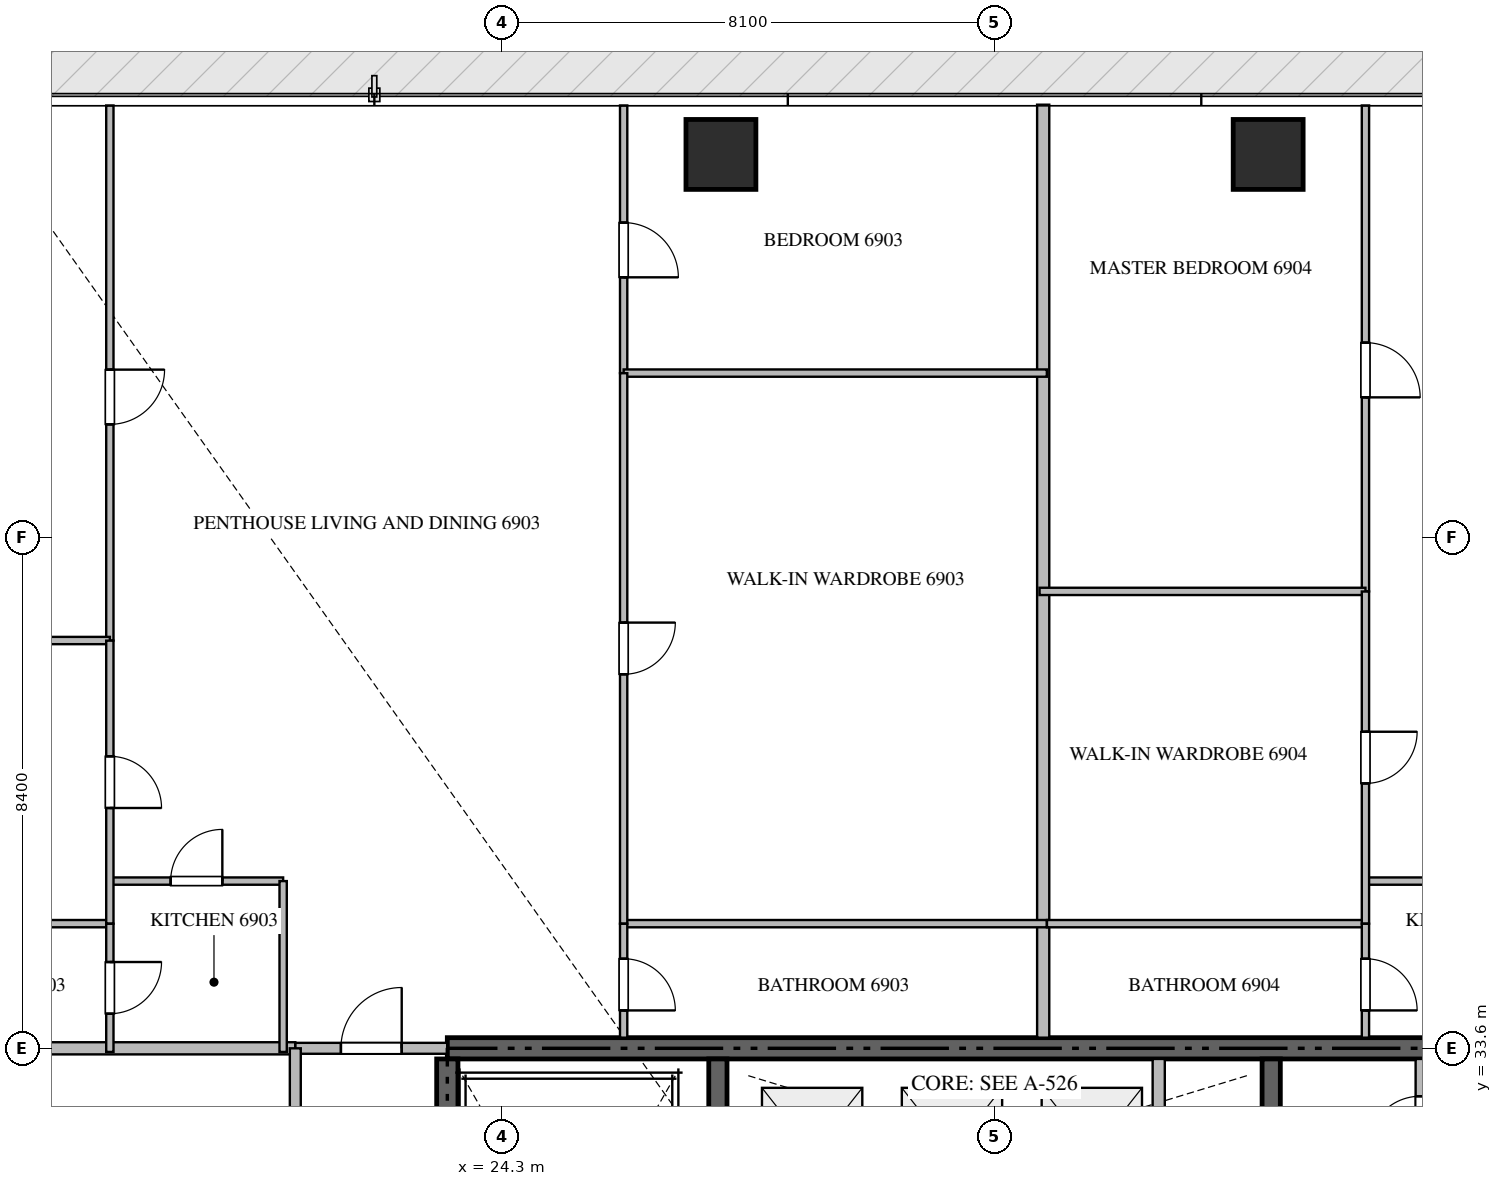
"""IFC4 building model, lengths in metres.
Left out: names, types, materials, properties, quantities, classifications, styles, units other than length and angle.
Written with IfcOpenShell. Run it as: python <this file> out.ifc"""

import sys

from ifc_helpers import new_model, si_unit, direction, frame, frame_2d, origin, origin_2d, place, context, subcontext, project, spatial, rectangle, extrude, source, transform, mapped, element, fill, save


model = new_model("IFC4")
c1 = context("Model", 3, precision=1e-05, world=origin(), true_north=direction((0.0, 1.0)))
c2 = subcontext(c1, "Body", "Model", "MODEL_VIEW")
j1 = project(units=[si_unit("LENGTHUNIT", "METRE"), si_unit("PLANEANGLEUNIT", "RADIAN")], contexts=[c1])
p1 = place(None, origin())
s1 = spatial("IfcSite", under=j1, at=p1, CompositionType="ELEMENT")
p2 = place(p1, origin())
s2 = spatial("IfcBuilding", under=s1, at=p2, CompositionType="ELEMENT")
p3 = place(p2, frame((0.0, 0.0, 275.9)))
s3 = spatial("IfcBuildingStorey", under=s2, at=p3, CompositionType="ELEMENT", Elevation=275.9)
p4 = place(p3, frame((41.4, 33.6, -0.26), z_axis=(0.0, 0.0, 1.0), x_axis=(-1.0, 0.0, 0.0)))
e1 = element("IfcWall", 1, at=p4, inside=s3, PredefinedType="SHEAR", context=c2, shape_type="SweptSolid", body=[
    extrude(rectangle(XDim=18.0, YDim=0.35, at=frame_2d((9.0, 0.0))), origin(), (0.0, 0.0, 1.0), 3.848),
])
p5 = place(p3, frame((23.4, 24.25, -0.26), z_axis=(0.0, 0.0, 1.0), x_axis=(0.0, 1.0, 0.0)))
e2 = element("IfcWall", 2, at=p5, inside=s3, PredefinedType="SHEAR", context=c2, shape_type="SweptSolid", body=[
    extrude(rectangle(XDim=9.175, YDim=0.35, at=frame_2d((4.587, 0.0))), origin(), (0.0, 0.0, 1.0), 3.848),
])
p6 = place(p3, frame((27.85, 23.55, -0.26), z_axis=(0.0, 0.0, 1.0), x_axis=(0.0, 1.0, 0.0)))
e3 = element("IfcWall", 3, at=p6, inside=s3, PredefinedType="SHEAR", context=c2, shape_type="SweptSolid", body=[
    extrude(rectangle(XDim=9.875, YDim=0.3, at=frame_2d((4.938, 0.0))), origin(), (0.0, 0.0, 1.0), 3.848),
])
p7 = place(p3, frame((36.95, 27.05, -0.26), z_axis=(0.0, 0.0, 1.0), x_axis=(0.0, 1.0, 0.0)))
e4 = element("IfcWall", 4, at=p7, inside=s3, PredefinedType="SHEAR", context=c2, shape_type="SweptSolid", body=[
    extrude(rectangle(XDim=6.375, YDim=0.3, at=frame_2d((3.188, 0.0))), origin(), (0.0, 0.0, 1.0), 3.848),
])
m1 = source(origin(), c2, "Body", "SweptSolid", [
    extrude(rectangle(XDim=1.15, YDim=1.15, at=origin_2d()), origin(), (0.0, 0.0, 1.0), 3.85),
])
for number, where, z_axis, x_axis in (
    (5, (27.9, 48.3, -0.26), (0.0, 0.0, 1.0), (1.0, 0.0, 0.0)),
    (6, (36.9, 48.3, -0.26), (0.0, 0.0, 1.0), (1.0, 0.0, 0.0)),
):
    element("IfcColumn", number, at=place(p3, frame(where, z_axis=z_axis, x_axis=x_axis)), inside=s3, PredefinedType="COLUMN", context=c2, shape_type="MappedRepresentation", body=[
        mapped(m1, transform((0.0, 0.0, 0.0), scale=1.0)),
    ])
p8 = place(p3, frame((35.1, 30.75, 0.0), z_axis=(0.0, 0.0, 1.0), x_axis=(0.0, 1.0, 0.0)))
e7 = element("IfcWall", 7, at=p8, inside=s3, PredefinedType="STANDARD", context=c2, shape_type="SweptSolid", body=[
    extrude(rectangle(XDim=2.675, YDim=0.2, at=frame_2d((1.337, 0.0))), origin(), (0.0, 0.0, 1.0), 3.59),
])
p9 = place(p3, frame((39.4, 31.35, 0.0), z_axis=(0.0, 0.0, 1.0), x_axis=(0.0, 1.0, 0.0)))
e8 = element("IfcWall", 8, at=p9, inside=s3, PredefinedType="PARTITIONING", context=c2, shape_type="SweptSolid", body=[
    extrude(rectangle(XDim=2.075, YDim=0.15, at=frame_2d((1.038, 0.0))), origin(), (0.0, 0.0, 1.0), 3.59),
])
p10 = place(p9, frame((0.612, 0.0, 0.0)))
e9 = element("IfcOpeningElement", 9, at=p10, cuts=e8, PredefinedType="OPENING", context=c2, shape_type="SweptSolid", body=[
    extrude(rectangle(XDim=0.85, YDim=2.1, at=frame_2d((0.425, 1.05))), frame((0.0, 0.085, 0.0), z_axis=(0.0, -1.0, 0.0), x_axis=(1.0, 0.0, 0.0)), (0.0, 0.0, 1.0), 0.17),
])
p11 = place(p3, frame((33.2, 33.775, 0.0), z_axis=(0.0, 0.0, 1.0), x_axis=(0.0, 1.0, 0.0)))
e10 = element("IfcWall", 10, at=p11, inside=s3, PredefinedType="PARTITIONING", context=c2, shape_type="SweptSolid", body=[
    extrude(rectangle(XDim=15.343, YDim=0.2, at=frame_2d((7.671, 0.0))), origin(), (0.0, 0.0, 1.0), 3.59),
])
p12 = place(p3, frame((7.482, 33.6, 0.0), z_axis=(0.0, 0.0, 1.0), x_axis=(1.0, 0.0, 0.0)))
e11 = element("IfcWall", 11, at=p12, inside=s3, PredefinedType="PARTITIONING", context=c2, shape_type="SweptSolid", body=[
    extrude(rectangle(XDim=13.418, YDim=0.2, at=frame_2d((6.709, 0.0))), origin(), (0.0, 0.0, 1.0), 3.59),
])
p13 = place(p3, frame((20.902, 33.6, 0.0), z_axis=(0.0, 0.0, 1.0), x_axis=(1.0, 0.0, 0.0)))
e12 = element("IfcWall", 12, at=p13, inside=s3, PredefinedType="PARTITIONING", context=c2, shape_type="SweptSolid", body=[
    extrude(rectangle(XDim=2.496, YDim=0.18, at=frame_2d((1.248, 0.0))), origin(), (0.0, 0.0, 1.0), 3.59),
])
p14 = place(p13, frame((0.748, 0.0, 0.0)))
e13 = element("IfcOpeningElement", 13, at=p14, cuts=e12, PredefinedType="OPENING", context=c2, shape_type="SweptSolid", body=[
    extrude(rectangle(XDim=1.0, YDim=2.15, at=frame_2d((0.5, 1.075))), frame((0.0, 0.1, 0.0), z_axis=(0.0, -1.0, 0.0), x_axis=(1.0, 0.0, 0.0)), (0.0, 0.0, 1.0), 0.2),
])
p15 = place(p3, frame((20.9, 16.8, 0.0), z_axis=(0.0, 0.0, 1.0), x_axis=(0.0, 1.0, 0.0)))
e14 = element("IfcWall", 14, at=p15, inside=s3, PredefinedType="PARTITIONING", context=c2, shape_type="SweptSolid", body=[
    extrude(rectangle(XDim=16.8, YDim=0.18, at=frame_2d((8.4, 0.0))), origin(), (0.0, 0.0, 1.0), 3.59),
])
p16 = place(p15, frame((4.898, 0.0, 0.0)))
e15 = element("IfcOpeningElement", 15, at=p16, cuts=e14, PredefinedType="OPENING", context=c2, shape_type="SweptSolid", body=[
    extrude(rectangle(XDim=1.0, YDim=2.15, at=frame_2d((0.5, 1.075))), frame((0.0, 0.1, 0.0), z_axis=(0.0, -1.0, 0.0), x_axis=(1.0, 0.0, 0.0)), (0.0, 0.0, 1.0), 0.2),
])
p17 = place(p15, frame((13.335, 0.0, 0.0)))
e16 = element("IfcOpeningElement", 16, at=p17, cuts=e14, PredefinedType="OPENING", context=c2, shape_type="SweptSolid", body=[
    extrude(rectangle(XDim=1.0, YDim=2.15, at=frame_2d((0.5, 1.075))), frame((0.0, 0.1, 0.0), z_axis=(0.0, -1.0, 0.0), x_axis=(1.0, 0.0, 0.0)), (0.0, 0.0, 1.0), 0.2),
])
p18 = place(p3, frame((17.85, 36.35, 0.0), z_axis=(0.0, 0.0, 1.0), x_axis=(1.0, 0.0, 0.0)))
e17 = element("IfcWall", 17, at=p18, inside=s3, PredefinedType="PARTITIONING", context=c2, shape_type="SweptSolid", body=[
    extrude(rectangle(XDim=2.85, YDim=0.12, at=frame_2d((1.425, 0.0))), origin(), (0.0, 0.0, 1.0), 3.59),
])
p19 = place(p18, frame((1.0, 0.0, 0.0)))
e18 = element("IfcOpeningElement", 18, at=p19, cuts=e17, PredefinedType="OPENING", context=c2, shape_type="SweptSolid", body=[
    extrude(rectangle(XDim=0.85, YDim=2.1, at=frame_2d((0.425, 1.05))), frame((0.0, 0.07, 0.0), z_axis=(0.0, -1.0, 0.0), x_axis=(1.0, 0.0, 0.0)), (0.0, 0.0, 1.0), 0.14),
])
p20 = place(p3, frame((20.7, 36.35, 0.0), z_axis=(0.0, 0.0, 1.0), x_axis=(0.0, -1.0, 0.0)))
e19 = element("IfcWall", 19, at=p20, inside=s3, PredefinedType="PARTITIONING", context=c2, shape_type="SweptSolid", body=[
    extrude(rectangle(XDim=2.81, YDim=0.12, at=frame_2d((1.405, 0.0))), origin(), (0.0, 0.0, 1.0), 3.59),
])
p21 = place(p3, frame((17.85, 49.105, 0.0), z_axis=(0.0, 0.0, 1.0), x_axis=(0.0, -1.0, 0.0)))
e20 = element("IfcWall", 20, at=p21, inside=s3, PredefinedType="PARTITIONING", context=c2, shape_type="SweptSolid", body=[
    extrude(rectangle(XDim=8.799, YDim=0.12, at=frame_2d((4.399, 0.0))), origin(), (0.0, 0.0, 1.0), 3.59),
])
p22 = place(p21, frame((4.344, 0.0, 0.0)))
e21 = element("IfcOpeningElement", 21, at=p22, cuts=e20, PredefinedType="OPENING", context=c2, shape_type="SweptSolid", body=[
    extrude(rectangle(XDim=0.9, YDim=2.1, at=frame_2d((0.45, 1.05))), frame((0.0, 0.07, 0.0), z_axis=(0.0, -1.0, 0.0), x_axis=(1.0, 0.0, 0.0)), (0.0, 0.0, 1.0), 0.14),
])
p23 = place(p3, frame((7.495, 40.306, 0.0), z_axis=(0.0, 0.0, 1.0), x_axis=(1.0, 0.0, 0.0)))
e22 = element("IfcWall", 22, at=p23, inside=s3, PredefinedType="PARTITIONING", context=c2, shape_type="SweptSolid", body=[
    extrude(rectangle(XDim=10.355, YDim=0.12, at=frame_2d((5.177, 0.0))), origin(), (0.0, 0.0, 1.0), 3.122),
])
p24 = place(p3, frame((14.65, 35.65, 0.0), z_axis=(0.0, 0.0, 1.0), x_axis=(1.0, 0.0, 0.0)))
e23 = element("IfcWall", 23, at=p24, inside=s3, PredefinedType="PARTITIONING", context=c2, shape_type="SweptSolid", body=[
    extrude(rectangle(XDim=3.2, YDim=0.12, at=frame_2d((1.6, 0.0))), origin(), (0.0, 0.0, 1.0), 3.59),
])
p25 = place(p3, frame((17.85, 40.304, 0.0), z_axis=(0.0, 0.0, 1.0), x_axis=(0.0, -1.0, 0.0)))
e24 = element("IfcWall", 24, at=p25, inside=s3, PredefinedType="PARTITIONING", context=c2, shape_type="SweptSolid", body=[
    extrude(rectangle(XDim=4.654, YDim=0.12, at=frame_2d((2.327, 0.0))), origin(), (0.0, 0.0, 1.0), 3.59),
])
p26 = place(p25, frame((1.902, 0.0, 0.0)))
e25 = element("IfcOpeningElement", 25, at=p26, cuts=e24, PredefinedType="OPENING", context=c2, shape_type="SweptSolid", body=[
    extrude(rectangle(XDim=0.85, YDim=2.1, at=frame_2d((0.425, 1.05))), frame((0.0, 0.07, 0.0), z_axis=(0.0, -1.0, 0.0), x_axis=(1.0, 0.0, 0.0)), (0.0, 0.0, 1.0), 0.14),
])
p27 = place(p3, frame((17.85, 35.648, 0.0), z_axis=(0.0, 0.0, 1.0), x_axis=(0.0, -1.0, 0.0)))
e26 = element("IfcWall", 26, at=p27, inside=s3, PredefinedType="PARTITIONING", context=c2, shape_type="SweptSolid", body=[
    extrude(rectangle(XDim=2.108, YDim=0.12, at=frame_2d((1.054, 0.0))), origin(), (0.0, 0.0, 1.0), 3.59),
])
p28 = place(p27, frame((0.629, 0.0, 0.0)))
e27 = element("IfcOpeningElement", 27, at=p28, cuts=e26, PredefinedType="OPENING", context=c2, shape_type="SweptSolid", body=[
    extrude(rectangle(XDim=0.85, YDim=2.1, at=frame_2d((0.425, 1.05))), frame((0.0, 0.07, 0.0), z_axis=(0.0, -1.0, 0.0), x_axis=(1.0, 0.0, 0.0)), (0.0, 0.0, 1.0), 0.14),
])
p29 = place(p3, frame((26.3, 49.105, 0.0), z_axis=(0.0, 0.0, 1.0), x_axis=(0.0, -1.0, 0.0)))
e28 = element("IfcWall", 28, at=p29, inside=s3, PredefinedType="PARTITIONING", context=c2, shape_type="SweptSolid", body=[
    extrude(rectangle(XDim=4.401, YDim=0.12, at=frame_2d((2.2, 0.0))), origin(), (0.0, 0.0, 1.0), 3.59),
])
p30 = place(p29, frame((1.926, 0.0, 0.0)))
e29 = element("IfcOpeningElement", 29, at=p30, cuts=e28, PredefinedType="OPENING", context=c2, shape_type="SweptSolid", body=[
    extrude(rectangle(XDim=0.9, YDim=2.1, at=frame_2d((0.45, 1.05))), frame((0.0, 0.07, 0.0), z_axis=(0.0, -1.0, 0.0), x_axis=(1.0, 0.0, 0.0)), (0.0, 0.0, 1.0), 0.14),
])
for number, where, z_axis, x_axis in (
    (30, (26.3, 44.704, 0.0), (0.0, 0.0, 1.0), (1.0, 0.0, 0.0)),
    (31, (26.3, 35.65, 0.0), (0.0, 0.0, 1.0), (1.0, 0.0, 0.0)),
):
    element("IfcWall", number, at=place(p3, frame(where, z_axis=z_axis, x_axis=x_axis)), inside=s3, PredefinedType="PARTITIONING", context=c2, shape_type="SweptSolid", body=[
        extrude(rectangle(XDim=6.96, YDim=0.12, at=frame_2d((3.48, 0.0))), origin(), (0.0, 0.0, 1.0), 3.59),
    ])
p31 = place(p3, frame((26.3, 44.702, 0.0), z_axis=(0.0, 0.0, 1.0), x_axis=(0.0, -1.0, 0.0)))
e32 = element("IfcWall", 32, at=p31, inside=s3, PredefinedType="PARTITIONING", context=c2, shape_type="SweptSolid", body=[
    extrude(rectangle(XDim=9.052, YDim=0.12, at=frame_2d((4.526, 0.0))), origin(), (0.0, 0.0, 1.0), 3.59),
])
p32 = place(p31, frame((4.101, 0.0, 0.0)))
e33 = element("IfcOpeningElement", 33, at=p32, cuts=e32, PredefinedType="OPENING", context=c2, shape_type="SweptSolid", body=[
    extrude(rectangle(XDim=0.85, YDim=2.1, at=frame_2d((0.425, 1.05))), frame((0.0, 0.07, 0.0), z_axis=(0.0, -1.0, 0.0), x_axis=(1.0, 0.0, 0.0)), (0.0, 0.0, 1.0), 0.14),
])
p33 = place(p3, frame((26.3, 35.648, 0.0), z_axis=(0.0, 0.0, 1.0), x_axis=(0.0, -1.0, 0.0)))
e34 = element("IfcWall", 34, at=p33, inside=s3, PredefinedType="PARTITIONING", context=c2, shape_type="SweptSolid", body=[
    extrude(rectangle(XDim=1.873, YDim=0.12, at=frame_2d((0.937, 0.0))), origin(), (0.0, 0.0, 1.0), 3.59),
])
p34 = place(p33, frame((0.575, 0.0, 0.0)))
e35 = element("IfcOpeningElement", 35, at=p34, cuts=e34, PredefinedType="OPENING", context=c2, shape_type="SweptSolid", body=[
    extrude(rectangle(XDim=0.85, YDim=2.1, at=frame_2d((0.425, 1.05))), frame((0.0, 0.07, 0.0), z_axis=(0.0, -1.0, 0.0), x_axis=(1.0, 0.0, 0.0)), (0.0, 0.0, 1.0), 0.14),
])
p35 = place(p3, frame((38.5, 36.35, 0.0), z_axis=(0.0, 0.0, 1.0), x_axis=(1.0, 0.0, 0.0)))
e36 = element("IfcWall", 36, at=p35, inside=s3, PredefinedType="PARTITIONING", context=c2, shape_type="SweptSolid", body=[
    extrude(rectangle(XDim=2.85, YDim=0.12, at=frame_2d((1.425, 0.0))), origin(), (0.0, 0.0, 1.0), 3.59),
])
p36 = place(p35, frame((1.0, 0.0, 0.0)))
e37 = element("IfcOpeningElement", 37, at=p36, cuts=e36, PredefinedType="OPENING", context=c2, shape_type="SweptSolid", body=[
    extrude(rectangle(XDim=0.85, YDim=2.1, at=frame_2d((0.425, 1.05))), frame((0.0, 0.07, 0.0), z_axis=(0.0, -1.0, 0.0), x_axis=(1.0, 0.0, 0.0)), (0.0, 0.0, 1.0), 0.14),
])
p37 = place(p3, frame((38.5, 49.105, 0.0), z_axis=(0.0, 0.0, 1.0), x_axis=(0.0, -1.0, 0.0)))
e38 = element("IfcWall", 38, at=p37, inside=s3, PredefinedType="PARTITIONING", context=c2, shape_type="SweptSolid", body=[
    extrude(rectangle(XDim=7.991, YDim=0.12, at=frame_2d((3.996, 0.0))), origin(), (0.0, 0.0, 1.0), 3.59),
])
p38 = place(p37, frame((3.9, 0.0, 0.0)))
e39 = element("IfcOpeningElement", 39, at=p38, cuts=e38, PredefinedType="OPENING", context=c2, shape_type="SweptSolid", body=[
    extrude(rectangle(XDim=0.9, YDim=2.1, at=frame_2d((0.45, 1.05))), frame((0.0, 0.07, 0.0), z_axis=(0.0, -1.0, 0.0), x_axis=(1.0, 0.0, 0.0)), (0.0, 0.0, 1.0), 0.14),
])
p39 = place(p3, frame((33.14, 41.114, 0.0), z_axis=(0.0, 0.0, 1.0), x_axis=(1.0, 0.0, 0.0)))
e40 = element("IfcWall", 40, at=p39, inside=s3, PredefinedType="PARTITIONING", context=c2, shape_type="SweptSolid", body=[
    extrude(rectangle(XDim=5.36, YDim=0.12, at=frame_2d((2.68, 0.0))), origin(), (0.0, 0.0, 1.0), 3.59),
])
p40 = place(p3, frame((33.262, 35.65, 0.0), z_axis=(0.0, 0.0, 1.0), x_axis=(1.0, 0.0, 0.0)))
e41 = element("IfcWall", 41, at=p40, inside=s3, PredefinedType="PARTITIONING", context=c2, shape_type="SweptSolid", body=[
    extrude(rectangle(XDim=5.238, YDim=0.12, at=frame_2d((2.619, 0.0))), origin(), (0.0, 0.0, 1.0), 3.59),
])
p41 = place(p3, frame((38.5, 41.112, 0.0), z_axis=(0.0, 0.0, 1.0), x_axis=(0.0, -1.0, 0.0)))
e42 = element("IfcWall", 42, at=p41, inside=s3, PredefinedType="PARTITIONING", context=c2, shape_type="SweptSolid", body=[
    extrude(rectangle(XDim=5.462, YDim=0.12, at=frame_2d((2.731, 0.0))), origin(), (0.0, 0.0, 1.0), 3.59),
])
p42 = place(p41, frame((2.306, 0.0, 0.0)))
e43 = element("IfcOpeningElement", 43, at=p42, cuts=e42, PredefinedType="OPENING", context=c2, shape_type="SweptSolid", body=[
    extrude(rectangle(XDim=0.85, YDim=2.1, at=frame_2d((0.425, 1.05))), frame((0.0, 0.07, 0.0), z_axis=(0.0, -1.0, 0.0), x_axis=(1.0, 0.0, 0.0)), (0.0, 0.0, 1.0), 0.14),
])
p43 = place(p3, frame((38.5, 35.648, 0.0), z_axis=(0.0, 0.0, 1.0), x_axis=(0.0, -1.0, 0.0)))
e44 = element("IfcWall", 44, at=p43, inside=s3, PredefinedType="PARTITIONING", context=c2, shape_type="SweptSolid", body=[
    extrude(rectangle(XDim=1.873, YDim=0.12, at=frame_2d((0.937, 0.0))), origin(), (0.0, 0.0, 1.0), 3.59),
])
p44 = place(p43, frame((0.575, 0.0, 0.0)))
e45 = element("IfcOpeningElement", 45, at=p44, cuts=e44, PredefinedType="OPENING", context=c2, shape_type="SweptSolid", body=[
    extrude(rectangle(XDim=0.85, YDim=2.1, at=frame_2d((0.425, 1.05))), frame((0.0, 0.07, 0.0), z_axis=(0.0, -1.0, 0.0), x_axis=(1.0, 0.0, 0.0)), (0.0, 0.0, 1.0), 0.14),
])
m2 = source(origin(), c2, "Body", "SweptSolid", [
    extrude(rectangle(XDim=0.85, YDim=2.1, at=frame_2d((0.425, 1.05))), frame((0.0, 0.025, 0.0), z_axis=(0.0, -1.0, 0.0), x_axis=(1.0, 0.0, 0.0)), (0.0, 0.0, 1.0), 0.05),
])
p45 = place(p10, origin())
e46 = element("IfcDoor", 46, at=p45, inside=s3, OperationType="SINGLE_SWING_LEFT", PredefinedType="DOOR", context=c2, shape_type="MappedRepresentation", body=[
    mapped(m2, transform((0.0, 0.0, 0.0), scale=1.0)),
])
fill(e9, e46)
m3 = source(origin(), c2, "Body", "SweptSolid", [
    extrude(rectangle(XDim=1.0, YDim=2.15, at=frame_2d((0.5, 1.075))), frame((0.0, 0.025, 0.0), z_axis=(0.0, -1.0, 0.0), x_axis=(1.0, 0.0, 0.0)), (0.0, 0.0, 1.0), 0.05),
])
p46 = place(p14, origin())
e47 = element("IfcDoor", 47, at=p46, inside=s3, OperationType="SINGLE_SWING_RIGHT", PredefinedType="DOOR", context=c2, shape_type="MappedRepresentation", body=[
    mapped(m3, transform((0.0, 0.0, 0.0), scale=1.0)),
])
fill(e13, e47)
p47 = place(p19, origin())
e48 = element("IfcDoor", 48, at=p47, inside=s3, OperationType="SINGLE_SWING_RIGHT", PredefinedType="DOOR", context=c2, shape_type="MappedRepresentation", body=[
    mapped(m2, transform((0.0, 0.0, 0.0), scale=1.0)),
])
fill(e18, e48)
m4 = source(origin(), c2, "Body", "SweptSolid", [
    extrude(rectangle(XDim=0.9, YDim=2.1, at=frame_2d((0.45, 1.05))), frame((0.0, 0.025, 0.0), z_axis=(0.0, -1.0, 0.0), x_axis=(1.0, 0.0, 0.0)), (0.0, 0.0, 1.0), 0.05),
])
p48 = place(p22, origin())
e49 = element("IfcDoor", 49, at=p48, inside=s3, OperationType="SINGLE_SWING_LEFT", PredefinedType="DOOR", context=c2, shape_type="MappedRepresentation", body=[
    mapped(m4, transform((0.0, 0.0, 0.0), scale=1.0)),
])
fill(e21, e49)
p49 = place(p26, origin())
e50 = element("IfcDoor", 50, at=p49, inside=s3, OperationType="SINGLE_SWING_RIGHT", PredefinedType="DOOR", context=c2, shape_type="MappedRepresentation", body=[
    mapped(m2, transform((0.0, 0.0, 0.0), scale=1.0)),
])
fill(e25, e50)
p50 = place(p28, origin())
e51 = element("IfcDoor", 51, at=p50, inside=s3, OperationType="SINGLE_SWING_LEFT", PredefinedType="DOOR", context=c2, shape_type="MappedRepresentation", body=[
    mapped(m2, transform((0.0, 0.0, 0.0), scale=1.0)),
])
fill(e27, e51)
p51 = place(p30, origin())
e52 = element("IfcDoor", 52, at=p51, inside=s3, OperationType="SINGLE_SWING_RIGHT", PredefinedType="DOOR", context=c2, shape_type="MappedRepresentation", body=[
    mapped(m4, transform((0.0, 0.0, 0.0), scale=1.0)),
])
fill(e29, e52)
p52 = place(p32, origin())
e53 = element("IfcDoor", 53, at=p52, inside=s3, OperationType="SINGLE_SWING_LEFT", PredefinedType="DOOR", context=c2, shape_type="MappedRepresentation", body=[
    mapped(m2, transform((0.0, 0.0, 0.0), scale=1.0)),
])
fill(e33, e53)
p53 = place(p34, origin())
e54 = element("IfcDoor", 54, at=p53, inside=s3, OperationType="SINGLE_SWING_RIGHT", PredefinedType="DOOR", context=c2, shape_type="MappedRepresentation", body=[
    mapped(m2, transform((0.0, 0.0, 0.0), scale=1.0)),
])
fill(e35, e54)
p54 = place(p38, origin())
e55 = element("IfcDoor", 55, at=p54, inside=s3, OperationType="SINGLE_SWING_RIGHT", PredefinedType="DOOR", context=c2, shape_type="MappedRepresentation", body=[
    mapped(m4, transform((0.0, 0.0, 0.0), scale=1.0)),
])
fill(e39, e55)
p55 = place(p42, origin())
e56 = element("IfcDoor", 56, at=p55, inside=s3, OperationType="SINGLE_SWING_LEFT", PredefinedType="DOOR", context=c2, shape_type="MappedRepresentation", body=[
    mapped(m2, transform((0.0, 0.0, 0.0), scale=1.0)),
])
fill(e43, e56)
p56 = place(p44, origin())
e57 = element("IfcDoor", 57, at=p56, inside=s3, OperationType="SINGLE_SWING_RIGHT", PredefinedType="DOOR", context=c2, shape_type="MappedRepresentation", body=[
    mapped(m2, transform((0.0, 0.0, 0.0), scale=1.0)),
])
fill(e45, e57)
save(model, sys.argv[1])
